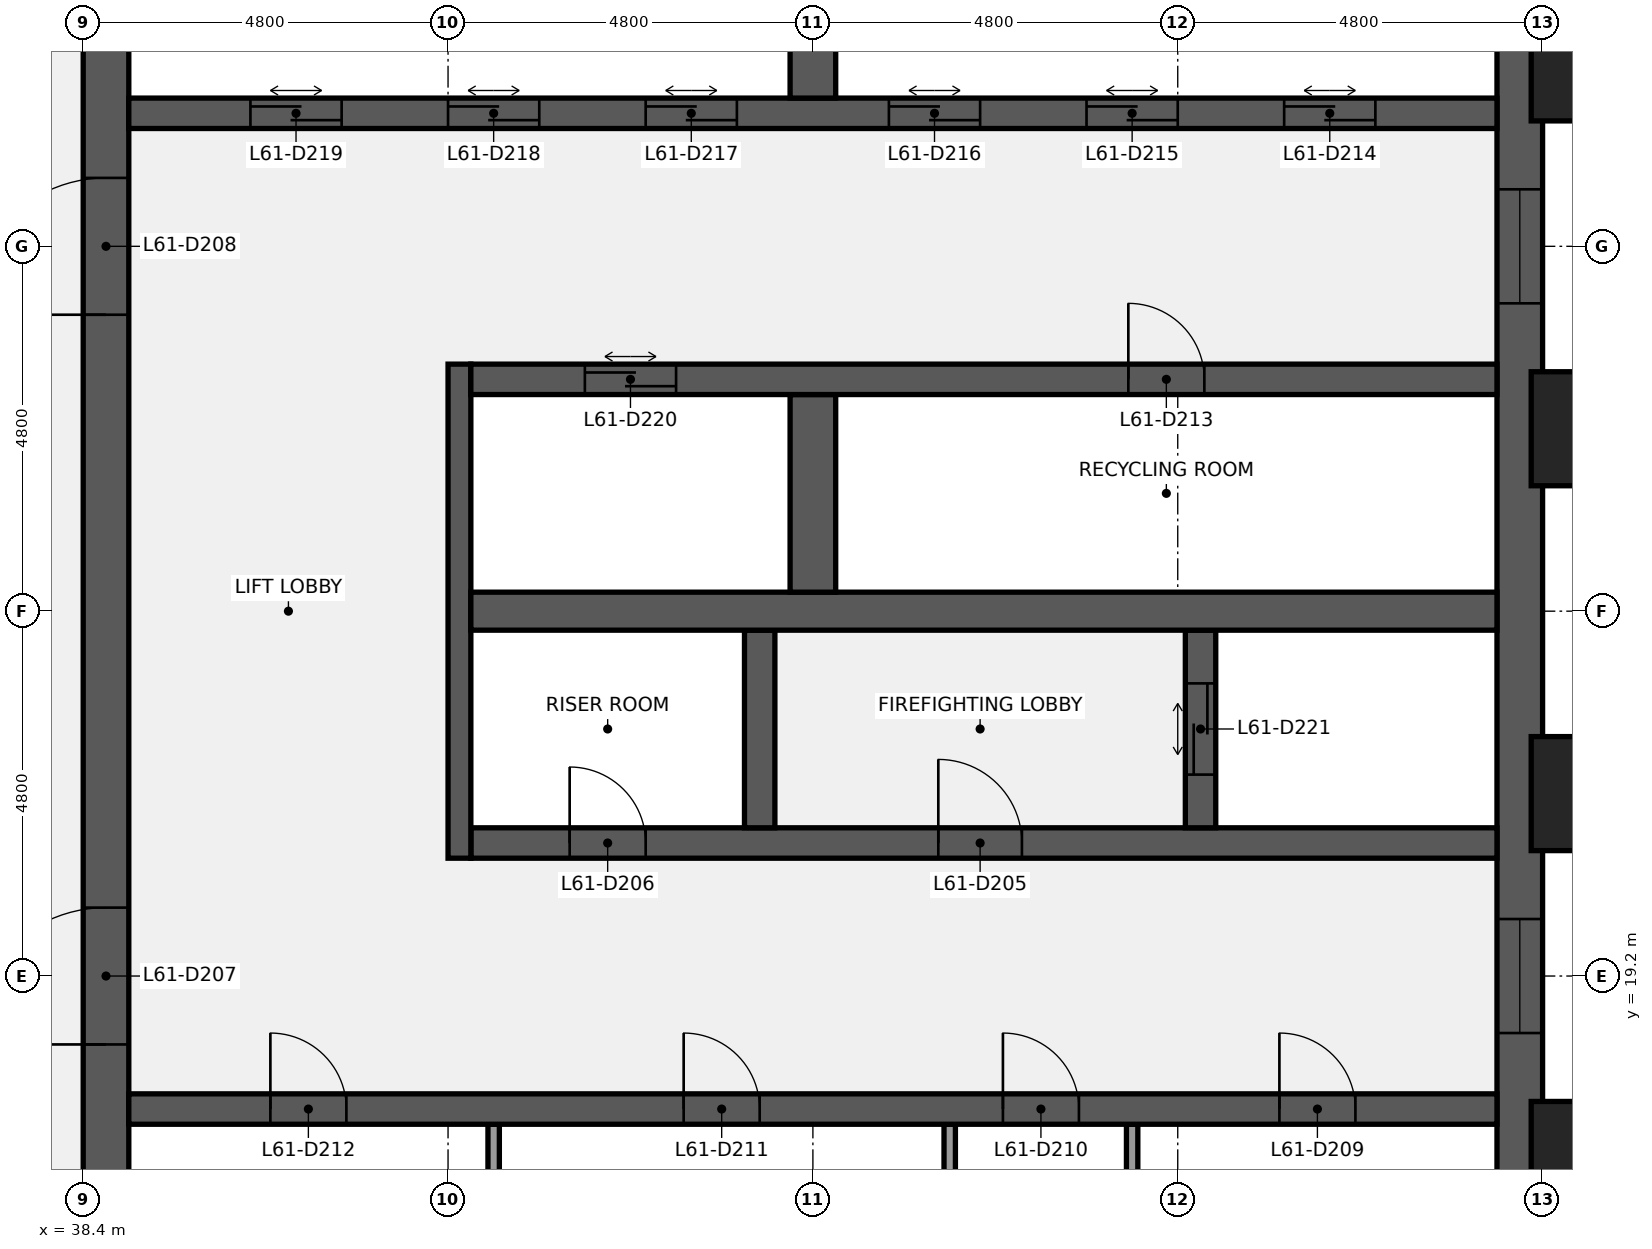
"""IFC4 building model, lengths in metres.
Left out: names, types, materials, properties, quantities, classifications, styles, units other than length and angle.
Written with IfcOpenShell. Run it as: python <this file> out.ifc"""

import sys

from ifc_helpers import new_model, si_unit, direction, frame, frame_2d, origin, origin_2d, place, context, subcontext, project, spatial, rectangle, extrude, element, fill, save


model = new_model("IFC4")
c1 = context("Model", 3, precision=1e-05, world=origin(), true_north=direction((0.0, 1.0)))
c2 = subcontext(c1, "Body", "Model", "MODEL_VIEW")
j1 = project(units=[si_unit("LENGTHUNIT", "METRE"), si_unit("PLANEANGLEUNIT", "RADIAN")], contexts=[c1])
p1 = place(None, origin())
s1 = spatial("IfcSite", under=j1, at=p1, CompositionType="ELEMENT")
p2 = place(p1, origin())
s2 = spatial("IfcBuilding", under=s1, at=p2, CompositionType="ELEMENT")
p3 = place(p2, frame((0.0, 0.0, 282.3)))
s3 = spatial("IfcBuildingStorey", under=s2, at=p3, CompositionType="ELEMENT", Elevation=282.3)
p4 = place(p3, frame((57.3, 38.4, 0.0), z_axis=(0.0, 0.0, 1.0), x_axis=(0.0, -1.0, 0.0)))
e1 = element("IfcWall", 1, at=p4, inside=s3, PredefinedType="SHEAR", context=c2, shape_type="SweptSolid", body=[
    extrude(rectangle(XDim=28.8, YDim=0.6, at=frame_2d((14.4, 0.0))), origin(), (0.0, 0.0, 1.0), 3.84),
])
p5 = place(p4, frame((18.45, 0.0, 0.9)))
e2 = element("IfcOpeningElement", 2, at=p5, cuts=e1, PredefinedType="OPENING", context=c2, shape_type="SweptSolid", body=[
    extrude(rectangle(XDim=1.5, YDim=1.5, at=frame_2d((0.75, 0.75))), frame((0.0, 0.31, 0.0), z_axis=(0.0, -1.0, 0.0), x_axis=(1.0, 0.0, 0.0)), (0.0, 0.0, 1.0), 0.62),
])
p6 = place(p4, frame((8.85, 0.0, 0.9)))
e3 = element("IfcOpeningElement", 3, at=p6, cuts=e1, PredefinedType="OPENING", context=c2, shape_type="SweptSolid", body=[
    extrude(rectangle(XDim=1.5, YDim=1.5, at=frame_2d((0.75, 0.75))), frame((0.0, 0.31, 0.0), z_axis=(0.0, -1.0, 0.0), x_axis=(1.0, 0.0, 0.0)), (0.0, 0.0, 1.0), 0.62),
])
p7 = place(p3, frame((38.7, 9.6, 0.0), z_axis=(0.0, 0.0, 1.0), x_axis=(0.0, 1.0, 0.0)))
e4 = element("IfcWall", 4, at=p7, inside=s3, PredefinedType="SHEAR", context=c2, shape_type="SweptSolid", body=[
    extrude(rectangle(XDim=28.8, YDim=0.6, at=frame_2d((14.4, 0.0))), origin(), (0.0, 0.0, 1.0), 3.84),
])
p8 = place(p7, frame((8.7, 0.0, 0.0)))
e5 = element("IfcOpeningElement", 5, at=p8, cuts=e4, PredefinedType="OPENING", context=c2, shape_type="SweptSolid", body=[
    extrude(rectangle(XDim=1.8, YDim=2.1, at=frame_2d((0.9, 1.05))), frame((0.0, 0.31, 0.0), z_axis=(0.0, -1.0, 0.0), x_axis=(1.0, 0.0, 0.0)), (0.0, 0.0, 1.0), 0.62),
])
p9 = place(p7, frame((18.3, 0.0, 0.0)))
e6 = element("IfcOpeningElement", 6, at=p9, cuts=e4, PredefinedType="OPENING", context=c2, shape_type="SweptSolid", body=[
    extrude(rectangle(XDim=1.8, YDim=2.1, at=frame_2d((0.9, 1.05))), frame((0.0, 0.31, 0.0), z_axis=(0.0, -1.0, 0.0), x_axis=(1.0, 0.0, 0.0)), (0.0, 0.0, 1.0), 0.62),
])
for number, where, z_axis, x_axis in (
    (7, (52.2, 14.65, 0.0), (0.0, 0.0, 1.0), (0.0, 1.0, 0.0)),
    (8, (49.8, 14.65, 0.0), (0.0, 0.0, 1.0), (0.0, 1.0, 0.0)),
    (9, (43.8, 14.65, 0.0), (0.0, 0.0, 1.0), (0.0, 1.0, 0.0)),
):
    element("IfcWall", number, at=place(p3, frame(where, z_axis=z_axis, x_axis=x_axis)), inside=s3, PredefinedType="PARTITIONING", context=c2, shape_type="SweptSolid", body=[
        extrude(rectangle(XDim=2.6, YDim=0.15, at=frame_2d((1.3, 0.0))), origin(), (0.0, 0.0, 1.0), 3.84),
    ])
p10 = place(p3, frame((39.0, 17.45, 0.0), z_axis=(0.0, 0.0, 1.0), x_axis=(1.0, 0.0, 0.0)))
e10 = element("IfcWall", 10, at=p10, inside=s3, PredefinedType="SHEAR", context=c2, shape_type="SweptSolid", body=[
    extrude(rectangle(XDim=18.0, YDim=0.4, at=frame_2d((9.0, 0.0))), origin(), (0.0, 0.0, 1.0), 3.84),
])
p11 = place(p10, frame((15.137, 0.0, 0.0)))
e11 = element("IfcOpeningElement", 11, at=p11, cuts=e10, PredefinedType="OPENING", context=c2, shape_type="SweptSolid", body=[
    extrude(rectangle(XDim=1.0, YDim=2.1, at=frame_2d((0.5, 1.05))), frame((0.0, 0.21, 0.0), z_axis=(0.0, -1.0, 0.0), x_axis=(1.0, 0.0, 0.0)), (0.0, 0.0, 1.0), 0.42),
])
p12 = place(p10, frame((11.5, 0.0, 0.0)))
e12 = element("IfcOpeningElement", 12, at=p12, cuts=e10, PredefinedType="OPENING", context=c2, shape_type="SweptSolid", body=[
    extrude(rectangle(XDim=1.0, YDim=2.1, at=frame_2d((0.5, 1.05))), frame((0.0, 0.21, 0.0), z_axis=(0.0, -1.0, 0.0), x_axis=(1.0, 0.0, 0.0)), (0.0, 0.0, 1.0), 0.42),
])
p13 = place(p10, frame((7.3, 0.0, 0.0)))
e13 = element("IfcOpeningElement", 13, at=p13, cuts=e10, PredefinedType="OPENING", context=c2, shape_type="SweptSolid", body=[
    extrude(rectangle(XDim=1.0, YDim=2.1, at=frame_2d((0.5, 1.05))), frame((0.0, 0.21, 0.0), z_axis=(0.0, -1.0, 0.0), x_axis=(1.0, 0.0, 0.0)), (0.0, 0.0, 1.0), 0.42),
])
p14 = place(p10, frame((1.863, 0.0, 0.0)))
e14 = element("IfcOpeningElement", 14, at=p14, cuts=e10, PredefinedType="OPENING", context=c2, shape_type="SweptSolid", body=[
    extrude(rectangle(XDim=1.0, YDim=2.1, at=frame_2d((0.5, 1.05))), frame((0.0, 0.21, 0.0), z_axis=(0.0, -1.0, 0.0), x_axis=(1.0, 0.0, 0.0)), (0.0, 0.0, 1.0), 0.42),
])
p15 = place(p3, frame((43.5, 20.95, 0.0), z_axis=(0.0, 0.0, 1.0), x_axis=(1.0, 0.0, 0.0)))
e15 = element("IfcWall", 15, at=p15, inside=s3, PredefinedType="SHEAR", context=c2, shape_type="SweptSolid", body=[
    extrude(rectangle(XDim=13.5, YDim=0.4, at=frame_2d((6.75, 0.0))), origin(), (0.0, 0.0, 1.0), 3.84),
])
p16 = place(p15, frame((6.15, 0.0, 0.0)))
e16 = element("IfcOpeningElement", 16, at=p16, cuts=e15, PredefinedType="OPENING", context=c2, shape_type="SweptSolid", body=[
    extrude(rectangle(XDim=1.1, YDim=2.1, at=frame_2d((0.55, 1.05))), frame((0.0, 0.21, 0.0), z_axis=(0.0, -1.0, 0.0), x_axis=(1.0, 0.0, 0.0)), (0.0, 0.0, 1.0), 0.42),
])
p17 = place(p15, frame((1.3, 0.0, 0.0)))
e17 = element("IfcOpeningElement", 17, at=p17, cuts=e15, PredefinedType="OPENING", context=c2, shape_type="SweptSolid", body=[
    extrude(rectangle(XDim=1.0, YDim=2.1, at=frame_2d((0.5, 1.05))), frame((0.0, 0.21, 0.0), z_axis=(0.0, -1.0, 0.0), x_axis=(1.0, 0.0, 0.0)), (0.0, 0.0, 1.0), 0.42),
])
p18 = place(p3, frame((43.35, 20.75, 0.0), z_axis=(0.0, 0.0, 1.0), x_axis=(0.0, 1.0, 0.0)))
e18 = element("IfcWall", 18, at=p18, inside=s3, PredefinedType="SHEAR", context=c2, shape_type="SweptSolid", body=[
    extrude(rectangle(XDim=6.5, YDim=0.3, at=frame_2d((3.25, 0.0))), origin(), (0.0, 0.0, 1.0), 3.84),
])
p19 = place(p3, frame((53.1, 21.15, 0.0), z_axis=(0.0, 0.0, 1.0), x_axis=(0.0, 1.0, 0.0)))
e19 = element("IfcWall", 19, at=p19, inside=s3, PredefinedType="SHEAR", context=c2, shape_type="SweptSolid", body=[
    extrude(rectangle(XDim=2.6, YDim=0.4, at=frame_2d((1.3, 0.0))), origin(), (0.0, 0.0, 1.0), 3.84),
])
p20 = place(p19, frame((0.7, 0.0, 0.0)))
e20 = element("IfcOpeningElement", 20, at=p20, cuts=e19, PredefinedType="OPENING", context=c2, shape_type="SweptSolid", body=[
    extrude(rectangle(XDim=1.2, YDim=2.1, at=frame_2d((0.6, 1.05))), frame((0.0, 0.21, 0.0), z_axis=(0.0, -1.0, 0.0), x_axis=(1.0, 0.0, 0.0)), (0.0, 0.0, 1.0), 0.42),
])
p21 = place(p3, frame((47.3, 21.15, 0.0), z_axis=(0.0, 0.0, 1.0), x_axis=(0.0, 1.0, 0.0)))
e21 = element("IfcWall", 21, at=p21, inside=s3, PredefinedType="SHEAR", context=c2, shape_type="SweptSolid", body=[
    extrude(rectangle(XDim=2.6, YDim=0.4, at=frame_2d((1.3, 0.0))), origin(), (0.0, 0.0, 1.0), 3.84),
])
p22 = place(p3, frame((43.5, 24.0, 0.0), z_axis=(0.0, 0.0, 1.0), x_axis=(1.0, 0.0, 0.0)))
e22 = element("IfcWall", 22, at=p22, inside=s3, PredefinedType="SHEAR", context=c2, shape_type="SweptSolid", body=[
    extrude(rectangle(XDim=13.5, YDim=0.5, at=frame_2d((6.75, 0.0))), origin(), (0.0, 0.0, 1.0), 3.84),
])
p23 = place(p3, frame((48.0, 24.25, 0.0), z_axis=(0.0, 0.0, 1.0), x_axis=(0.0, 1.0, 0.0)))
e23 = element("IfcWall", 23, at=p23, inside=s3, PredefinedType="SHEAR", context=c2, shape_type="SweptSolid", body=[
    extrude(rectangle(XDim=2.6, YDim=0.6, at=frame_2d((1.3, 0.0))), origin(), (0.0, 0.0, 1.0), 3.84),
])
p24 = place(p3, frame((43.5, 27.05, 0.0), z_axis=(0.0, 0.0, 1.0), x_axis=(1.0, 0.0, 0.0)))
e24 = element("IfcWall", 24, at=p24, inside=s3, PredefinedType="SHEAR", context=c2, shape_type="SweptSolid", body=[
    extrude(rectangle(XDim=13.5, YDim=0.4, at=frame_2d((6.75, 0.0))), origin(), (0.0, 0.0, 1.0), 3.84),
])
p25 = place(p24, frame((8.65, 0.0, 0.0)))
e25 = element("IfcOpeningElement", 25, at=p25, cuts=e24, PredefinedType="OPENING", context=c2, shape_type="SweptSolid", body=[
    extrude(rectangle(XDim=1.0, YDim=2.1, at=frame_2d((0.5, 1.05))), frame((0.0, 0.21, 0.0), z_axis=(0.0, -1.0, 0.0), x_axis=(1.0, 0.0, 0.0)), (0.0, 0.0, 1.0), 0.42),
])
p26 = place(p24, frame((1.5, 0.0, 0.0)))
e26 = element("IfcOpeningElement", 26, at=p26, cuts=e24, PredefinedType="OPENING", context=c2, shape_type="SweptSolid", body=[
    extrude(rectangle(XDim=1.2, YDim=2.1, at=frame_2d((0.6, 1.05))), frame((0.0, 0.21, 0.0), z_axis=(0.0, -1.0, 0.0), x_axis=(1.0, 0.0, 0.0)), (0.0, 0.0, 1.0), 0.42),
])
p27 = place(p3, frame((39.0, 30.55, 0.0), z_axis=(0.0, 0.0, 1.0), x_axis=(1.0, 0.0, 0.0)))
e27 = element("IfcWall", 27, at=p27, inside=s3, PredefinedType="SHEAR", context=c2, shape_type="SweptSolid", body=[
    extrude(rectangle(XDim=18.0, YDim=0.4, at=frame_2d((9.0, 0.0))), origin(), (0.0, 0.0, 1.0), 3.84),
])
p28 = place(p27, frame((15.2, 0.0, 0.0)))
e28 = element("IfcOpeningElement", 28, at=p28, cuts=e27, PredefinedType="OPENING", context=c2, shape_type="SweptSolid", body=[
    extrude(rectangle(XDim=1.2, YDim=2.1, at=frame_2d((0.6, 1.05))), frame((0.0, 0.21, 0.0), z_axis=(0.0, -1.0, 0.0), x_axis=(1.0, 0.0, 0.0)), (0.0, 0.0, 1.0), 0.42),
])
p29 = place(p27, frame((12.6, 0.0, 0.0)))
e29 = element("IfcOpeningElement", 29, at=p29, cuts=e27, PredefinedType="OPENING", context=c2, shape_type="SweptSolid", body=[
    extrude(rectangle(XDim=1.2, YDim=2.1, at=frame_2d((0.6, 1.05))), frame((0.0, 0.21, 0.0), z_axis=(0.0, -1.0, 0.0), x_axis=(1.0, 0.0, 0.0)), (0.0, 0.0, 1.0), 0.42),
])
p30 = place(p27, frame((10.0, 0.0, 0.0)))
e30 = element("IfcOpeningElement", 30, at=p30, cuts=e27, PredefinedType="OPENING", context=c2, shape_type="SweptSolid", body=[
    extrude(rectangle(XDim=1.2, YDim=2.1, at=frame_2d((0.6, 1.05))), frame((0.0, 0.21, 0.0), z_axis=(0.0, -1.0, 0.0), x_axis=(1.0, 0.0, 0.0)), (0.0, 0.0, 1.0), 0.42),
])
p31 = place(p27, frame((6.8, 0.0, 0.0)))
e31 = element("IfcOpeningElement", 31, at=p31, cuts=e27, PredefinedType="OPENING", context=c2, shape_type="SweptSolid", body=[
    extrude(rectangle(XDim=1.2, YDim=2.1, at=frame_2d((0.6, 1.05))), frame((0.0, 0.21, 0.0), z_axis=(0.0, -1.0, 0.0), x_axis=(1.0, 0.0, 0.0)), (0.0, 0.0, 1.0), 0.42),
])
p32 = place(p27, frame((4.2, 0.0, 0.0)))
e32 = element("IfcOpeningElement", 32, at=p32, cuts=e27, PredefinedType="OPENING", context=c2, shape_type="SweptSolid", body=[
    extrude(rectangle(XDim=1.2, YDim=2.1, at=frame_2d((0.6, 1.05))), frame((0.0, 0.21, 0.0), z_axis=(0.0, -1.0, 0.0), x_axis=(1.0, 0.0, 0.0)), (0.0, 0.0, 1.0), 0.42),
])
p33 = place(p27, frame((1.6, 0.0, 0.0)))
e33 = element("IfcOpeningElement", 33, at=p33, cuts=e27, PredefinedType="OPENING", context=c2, shape_type="SweptSolid", body=[
    extrude(rectangle(XDim=1.2, YDim=2.1, at=frame_2d((0.6, 1.05))), frame((0.0, 0.21, 0.0), z_axis=(0.0, -1.0, 0.0), x_axis=(1.0, 0.0, 0.0)), (0.0, 0.0, 1.0), 0.42),
])
p34 = place(p3, frame((48.0, 30.75, 0.0), z_axis=(0.0, 0.0, 1.0), x_axis=(0.0, 1.0, 0.0)))
e34 = element("IfcWall", 34, at=p34, inside=s3, PredefinedType="SHEAR", context=c2, shape_type="SweptSolid", body=[
    extrude(rectangle(XDim=2.6, YDim=0.6, at=frame_2d((1.3, 0.0))), origin(), (0.0, 0.0, 1.0), 3.84),
])
for number, where, z_axis, x_axis in (
    (35, (58.35, 16.8, 0.0), (0.0, 0.0, 1.0), (0.0, 1.0, 0.0)),
    (36, (58.35, 21.6, 0.0), (0.0, 0.0, 1.0), (0.0, 1.0, 0.0)),
    (37, (58.35, 26.4, 0.0), (0.0, 0.0, 1.0), (0.0, 1.0, 0.0)),
    (38, (58.35, 31.2, 0.0), (0.0, 0.0, 1.0), (0.0, 1.0, 0.0)),
):
    element("IfcColumn", number, at=place(p3, frame(where, z_axis=z_axis, x_axis=x_axis)), inside=s3, PredefinedType="PILASTER", context=c2, shape_type="SweptSolid", body=[
        extrude(rectangle(XDim=1.8, YDim=1.5, at=origin_2d()), origin(), (0.0, 0.0, 1.0), 4.0),
    ])
p35 = place(p16, origin())
e39 = element("IfcDoor", 39, at=p35, inside=s3, OperationType="SINGLE_SWING_LEFT", PredefinedType="DOOR", context=c2, shape_type="SweptSolid", body=[
    extrude(rectangle(XDim=1.1, YDim=2.1, at=frame_2d((0.55, 1.05))), frame((0.0, 0.025, 0.0), z_axis=(0.0, -1.0, 0.0), x_axis=(1.0, 0.0, 0.0)), (0.0, 0.0, 1.0), 0.05),
])
fill(e16, e39)
p36 = place(p17, origin())
e40 = element("IfcDoor", 40, at=p36, inside=s3, OperationType="SINGLE_SWING_LEFT", PredefinedType="DOOR", context=c2, shape_type="SweptSolid", body=[
    extrude(rectangle(XDim=1.0, YDim=2.1, at=frame_2d((0.5, 1.05))), frame((0.0, 0.025, 0.0), z_axis=(0.0, -1.0, 0.0), x_axis=(1.0, 0.0, 0.0)), (0.0, 0.0, 1.0), 0.05),
])
fill(e17, e40)
p37 = place(p8, origin())
e41 = element("IfcDoor", 41, at=p37, inside=s3, OperationType="DOUBLE_DOOR_SINGLE_SWING", PredefinedType="DOOR", context=c2, shape_type="SweptSolid", body=[
    extrude(rectangle(XDim=1.8, YDim=2.1, at=frame_2d((0.9, 1.05))), frame((0.0, 0.025, 0.0), z_axis=(0.0, -1.0, 0.0), x_axis=(1.0, 0.0, 0.0)), (0.0, 0.0, 1.0), 0.05),
])
fill(e5, e41)
p38 = place(p9, origin())
e42 = element("IfcDoor", 42, at=p38, inside=s3, OperationType="DOUBLE_DOOR_SINGLE_SWING", PredefinedType="DOOR", context=c2, shape_type="SweptSolid", body=[
    extrude(rectangle(XDim=1.8, YDim=2.1, at=frame_2d((0.9, 1.05))), frame((0.0, 0.025, 0.0), z_axis=(0.0, -1.0, 0.0), x_axis=(1.0, 0.0, 0.0)), (0.0, 0.0, 1.0), 0.05),
])
fill(e6, e42)
p39 = place(p11, origin())
e43 = element("IfcDoor", 43, at=p39, inside=s3, OperationType="SINGLE_SWING_LEFT", PredefinedType="DOOR", context=c2, shape_type="SweptSolid", body=[
    extrude(rectangle(XDim=1.0, YDim=2.1, at=frame_2d((0.5, 1.05))), frame((0.0, 0.025, 0.0), z_axis=(0.0, -1.0, 0.0), x_axis=(1.0, 0.0, 0.0)), (0.0, 0.0, 1.0), 0.05),
])
fill(e11, e43)
p40 = place(p12, origin())
e44 = element("IfcDoor", 44, at=p40, inside=s3, OperationType="SINGLE_SWING_LEFT", PredefinedType="DOOR", context=c2, shape_type="SweptSolid", body=[
    extrude(rectangle(XDim=1.0, YDim=2.1, at=frame_2d((0.5, 1.05))), frame((0.0, 0.025, 0.0), z_axis=(0.0, -1.0, 0.0), x_axis=(1.0, 0.0, 0.0)), (0.0, 0.0, 1.0), 0.05),
])
fill(e12, e44)
p41 = place(p13, origin())
e45 = element("IfcDoor", 45, at=p41, inside=s3, OperationType="SINGLE_SWING_LEFT", PredefinedType="DOOR", context=c2, shape_type="SweptSolid", body=[
    extrude(rectangle(XDim=1.0, YDim=2.1, at=frame_2d((0.5, 1.05))), frame((0.0, 0.025, 0.0), z_axis=(0.0, -1.0, 0.0), x_axis=(1.0, 0.0, 0.0)), (0.0, 0.0, 1.0), 0.05),
])
fill(e13, e45)
p42 = place(p14, origin())
e46 = element("IfcDoor", 46, at=p42, inside=s3, OperationType="SINGLE_SWING_LEFT", PredefinedType="DOOR", context=c2, shape_type="SweptSolid", body=[
    extrude(rectangle(XDim=1.0, YDim=2.1, at=frame_2d((0.5, 1.05))), frame((0.0, 0.025, 0.0), z_axis=(0.0, -1.0, 0.0), x_axis=(1.0, 0.0, 0.0)), (0.0, 0.0, 1.0), 0.05),
])
fill(e14, e46)
p43 = place(p25, origin())
e47 = element("IfcDoor", 47, at=p43, inside=s3, OperationType="SINGLE_SWING_LEFT", PredefinedType="DOOR", context=c2, shape_type="SweptSolid", body=[
    extrude(rectangle(XDim=1.0, YDim=2.1, at=frame_2d((0.5, 1.05))), frame((0.0, 0.025, 0.0), z_axis=(0.0, -1.0, 0.0), x_axis=(1.0, 0.0, 0.0)), (0.0, 0.0, 1.0), 0.05),
])
fill(e25, e47)
p44 = place(p28, origin())
e48 = element("IfcDoor", 48, at=p44, inside=s3, OperationType="DOUBLE_DOOR_SLIDING", PredefinedType="DOOR", context=c2, shape_type="SweptSolid", body=[
    extrude(rectangle(XDim=1.2, YDim=2.1, at=frame_2d((0.6, 1.05))), frame((0.0, 0.025, 0.0), z_axis=(0.0, -1.0, 0.0), x_axis=(1.0, 0.0, 0.0)), (0.0, 0.0, 1.0), 0.05),
])
fill(e28, e48)
p45 = place(p29, origin())
e49 = element("IfcDoor", 49, at=p45, inside=s3, OperationType="DOUBLE_DOOR_SLIDING", PredefinedType="DOOR", context=c2, shape_type="SweptSolid", body=[
    extrude(rectangle(XDim=1.2, YDim=2.1, at=frame_2d((0.6, 1.05))), frame((0.0, 0.025, 0.0), z_axis=(0.0, -1.0, 0.0), x_axis=(1.0, 0.0, 0.0)), (0.0, 0.0, 1.0), 0.05),
])
fill(e29, e49)
p46 = place(p30, origin())
e50 = element("IfcDoor", 50, at=p46, inside=s3, OperationType="DOUBLE_DOOR_SLIDING", PredefinedType="DOOR", context=c2, shape_type="SweptSolid", body=[
    extrude(rectangle(XDim=1.2, YDim=2.1, at=frame_2d((0.6, 1.05))), frame((0.0, 0.025, 0.0), z_axis=(0.0, -1.0, 0.0), x_axis=(1.0, 0.0, 0.0)), (0.0, 0.0, 1.0), 0.05),
])
fill(e30, e50)
p47 = place(p31, origin())
e51 = element("IfcDoor", 51, at=p47, inside=s3, OperationType="DOUBLE_DOOR_SLIDING", PredefinedType="DOOR", context=c2, shape_type="SweptSolid", body=[
    extrude(rectangle(XDim=1.2, YDim=2.1, at=frame_2d((0.6, 1.05))), frame((0.0, 0.025, 0.0), z_axis=(0.0, -1.0, 0.0), x_axis=(1.0, 0.0, 0.0)), (0.0, 0.0, 1.0), 0.05),
])
fill(e31, e51)
p48 = place(p32, origin())
e52 = element("IfcDoor", 52, at=p48, inside=s3, OperationType="DOUBLE_DOOR_SLIDING", PredefinedType="DOOR", context=c2, shape_type="SweptSolid", body=[
    extrude(rectangle(XDim=1.2, YDim=2.1, at=frame_2d((0.6, 1.05))), frame((0.0, 0.025, 0.0), z_axis=(0.0, -1.0, 0.0), x_axis=(1.0, 0.0, 0.0)), (0.0, 0.0, 1.0), 0.05),
])
fill(e32, e52)
p49 = place(p33, origin())
e53 = element("IfcDoor", 53, at=p49, inside=s3, OperationType="DOUBLE_DOOR_SLIDING", PredefinedType="DOOR", context=c2, shape_type="SweptSolid", body=[
    extrude(rectangle(XDim=1.2, YDim=2.1, at=frame_2d((0.6, 1.05))), frame((0.0, 0.025, 0.0), z_axis=(0.0, -1.0, 0.0), x_axis=(1.0, 0.0, 0.0)), (0.0, 0.0, 1.0), 0.05),
])
fill(e33, e53)
p50 = place(p26, origin())
e54 = element("IfcDoor", 54, at=p50, inside=s3, OperationType="DOUBLE_DOOR_SLIDING", PredefinedType="DOOR", context=c2, shape_type="SweptSolid", body=[
    extrude(rectangle(XDim=1.2, YDim=2.1, at=frame_2d((0.6, 1.05))), frame((0.0, 0.025, 0.0), z_axis=(0.0, -1.0, 0.0), x_axis=(1.0, 0.0, 0.0)), (0.0, 0.0, 1.0), 0.05),
])
fill(e26, e54)
p51 = place(p20, origin())
e55 = element("IfcDoor", 55, at=p51, inside=s3, OperationType="DOUBLE_DOOR_SLIDING", PredefinedType="DOOR", context=c2, shape_type="SweptSolid", body=[
    extrude(rectangle(XDim=1.2, YDim=2.1, at=frame_2d((0.6, 1.05))), frame((0.0, 0.025, 0.0), z_axis=(0.0, -1.0, 0.0), x_axis=(1.0, 0.0, 0.0)), (0.0, 0.0, 1.0), 0.05),
])
fill(e20, e55)
p52 = place(p5, origin())
e56 = element("IfcWindow", 56, at=p52, inside=s3, PartitioningType="SINGLE_PANEL", PredefinedType="WINDOW", context=c2, shape_type="SweptSolid", body=[
    extrude(rectangle(XDim=1.5, YDim=1.5, at=frame_2d((0.75, 0.75))), frame((0.0, 0.03, 0.0), z_axis=(0.0, -1.0, 0.0), x_axis=(1.0, 0.0, 0.0)), (0.0, 0.0, 1.0), 0.06),
])
fill(e2, e56)
p53 = place(p6, origin())
e57 = element("IfcWindow", 57, at=p53, inside=s3, PartitioningType="SINGLE_PANEL", PredefinedType="WINDOW", context=c2, shape_type="SweptSolid", body=[
    extrude(rectangle(XDim=1.5, YDim=1.5, at=frame_2d((0.75, 0.75))), frame((0.0, 0.03, 0.0), z_axis=(0.0, -1.0, 0.0), x_axis=(1.0, 0.0, 0.0)), (0.0, 0.0, 1.0), 0.06),
])
fill(e3, e57)
save(model, sys.argv[1])
